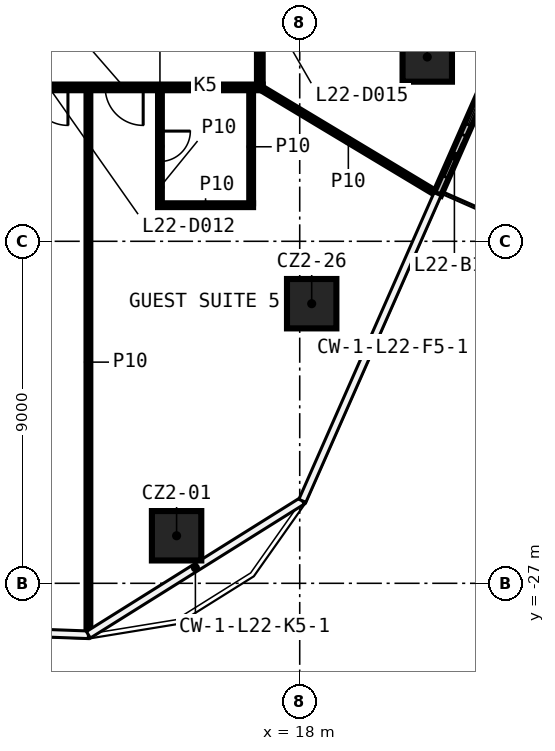
"""IFC4 building model, lengths in metres.
Left out: names, types, materials, properties, quantities, classifications, styles, units other than length and angle.
Written with IfcOpenShell. Run it as: python <this file> out.ifc"""

import sys

from ifc_helpers import new_model, si_unit, direction, frame, frame_2d, origin, origin_2d, place, context, subcontext, project, spatial, rectangle, extrude, element, fill, save


model = new_model("IFC4")
c1 = context("Model", 3, precision=1e-05, world=origin(), true_north=direction((0.0, 1.0)))
c2 = subcontext(c1, "Body", "Model", "MODEL_VIEW")
j1 = project(units=[si_unit("LENGTHUNIT", "METRE"), si_unit("PLANEANGLEUNIT", "RADIAN")], contexts=[c1])
p1 = place(None, origin())
s1 = spatial("IfcSite", under=j1, at=p1, CompositionType="ELEMENT")
p2 = place(p1, origin())
s2 = spatial("IfcBuilding", under=s1, at=p2, CompositionType="ELEMENT")
p3 = place(p2, frame((0.0, 0.0, 106.3)))
s3 = spatial("IfcBuildingStorey", under=s2, at=p3, CompositionType="ELEMENT", Elevation=106.3)
for number, where, z_axis, x_axis in (
    (1, (14.76, -25.749, 0.0), (0.0, 0.0, 1.0), (1.0, 0.0, 0.0)),
    (2, (21.356, -13.15, 0.0), (0.0, 0.0, 1.0), (1.0, 0.0, 0.0)),
    (3, (18.315, -19.642, 0.0), (0.0, 0.0, 1.0), (1.0, 0.0, 0.0)),
):
    element("IfcColumn", number, at=place(p3, frame(where, z_axis=z_axis, x_axis=x_axis)), inside=s3, PredefinedType="COLUMN", context=c2, shape_type="SweptSolid", body=[
        extrude(rectangle(XDim=1.3, YDim=1.3, at=origin_2d()), origin(), (0.0, 0.0, 1.0), 3.3),
    ])
p4 = place(p3, frame((14.272, -17.05, 0.0), z_axis=(0.0, 0.0, 1.0), x_axis=(1.0, 0.0, 0.0)))
e4 = element("IfcWall", 4, at=p4, inside=s3, PredefinedType="PARTITIONING", context=c2, shape_type="SweptSolid", body=[
    extrude(rectangle(XDim=2.5, YDim=0.1, at=frame_2d((1.25, 0.0))), origin(), (0.0, 0.0, 1.0), 3.3),
])
p5 = place(p3, frame((17.025, -13.95, 0.0), z_axis=(0.0, 0.0, 1.0), x_axis=(-1.0, 0.0, 0.0)))
e5 = element("IfcWall", 5, at=p5, inside=s3, PredefinedType="PARTITIONING", context=c2, shape_type="SweptSolid", body=[
    extrude(rectangle(XDim=34.05, YDim=0.15, at=frame_2d((17.025, 0.0))), origin(), (0.0, 0.0, 1.0), 3.3),
])
p6 = place(p5, frame((31.974, 0.0, 0.0)))
e6 = element("IfcOpeningElement", 6, at=p6, cuts=e5, PredefinedType="OPENING", context=c2, shape_type="SweptSolid", body=[
    extrude(rectangle(XDim=0.9, YDim=2.1, at=frame_2d((0.45, 1.05))), frame((0.0, 0.085, 0.0), z_axis=(0.0, -1.0, 0.0), x_axis=(1.0, 0.0, 0.0)), (0.0, 0.0, 1.0), 0.17),
])
p7 = place(p5, frame((27.543, 0.0, 0.0)))
e7 = element("IfcOpeningElement", 7, at=p7, cuts=e5, PredefinedType="OPENING", context=c2, shape_type="SweptSolid", body=[
    extrude(rectangle(XDim=1.0, YDim=2.1, at=frame_2d((0.5, 1.05))), frame((0.0, 0.085, 0.0), z_axis=(0.0, -1.0, 0.0), x_axis=(1.0, 0.0, 0.0)), (0.0, 0.0, 1.0), 0.17),
])
p8 = place(p5, frame((16.333, 0.0, 0.0)))
e8 = element("IfcOpeningElement", 8, at=p8, cuts=e5, PredefinedType="OPENING", context=c2, shape_type="SweptSolid", body=[
    extrude(rectangle(XDim=1.0, YDim=2.1, at=frame_2d((0.5, 1.05))), frame((0.0, 0.085, 0.0), z_axis=(0.0, -1.0, 0.0), x_axis=(1.0, 0.0, 0.0)), (0.0, 0.0, 1.0), 0.17),
])
p9 = place(p5, frame((12.006, 0.0, 0.0)))
e9 = element("IfcOpeningElement", 9, at=p9, cuts=e5, PredefinedType="OPENING", context=c2, shape_type="SweptSolid", body=[
    extrude(rectangle(XDim=1.0, YDim=2.1, at=frame_2d((0.5, 1.05))), frame((0.0, 0.085, 0.0), z_axis=(0.0, -1.0, 0.0), x_axis=(1.0, 0.0, 0.0)), (0.0, 0.0, 1.0), 0.17),
])
p10 = place(p5, frame((5.124, 0.0, 0.0)))
e10 = element("IfcOpeningElement", 10, at=p10, cuts=e5, PredefinedType="OPENING", context=c2, shape_type="SweptSolid", body=[
    extrude(rectangle(XDim=1.0, YDim=2.1, at=frame_2d((0.5, 1.05))), frame((0.0, 0.085, 0.0), z_axis=(0.0, -1.0, 0.0), x_axis=(1.0, 0.0, 0.0)), (0.0, 0.0, 1.0), 0.17),
])
p11 = place(p5, frame((3.144, 0.0, 0.0)))
e11 = element("IfcOpeningElement", 11, at=p11, cuts=e5, PredefinedType="OPENING", context=c2, shape_type="SweptSolid", body=[
    extrude(rectangle(XDim=1.0, YDim=2.1, at=frame_2d((0.5, 1.05))), frame((0.0, 0.085, 0.0), z_axis=(0.0, -1.0, 0.0), x_axis=(1.0, 0.0, 0.0)), (0.0, 0.0, 1.0), 0.17),
])
p12 = place(p3, frame((16.95, 13.875, 0.0), z_axis=(0.0, 0.0, 1.0), x_axis=(0.0, -1.0, 0.0)))
e12 = element("IfcWall", 12, at=p12, inside=s3, PredefinedType="PARTITIONING", context=c2, shape_type="SweptSolid", body=[
    extrude(rectangle(XDim=27.75, YDim=0.15, at=frame_2d((13.875, 0.0))), origin(), (0.0, 0.0, 1.0), 3.3),
])
p13 = place(p12, frame((24.917, 0.0, 0.0)))
e13 = element("IfcOpeningElement", 13, at=p13, cuts=e12, PredefinedType="OPENING", context=c2, shape_type="SweptSolid", body=[
    extrude(rectangle(XDim=0.9, YDim=2.1, at=frame_2d((0.45, 1.05))), frame((0.0, 0.085, 0.0), z_axis=(0.0, -1.0, 0.0), x_axis=(1.0, 0.0, 0.0)), (0.0, 0.0, 1.0), 0.17),
])
p14 = place(p12, frame((20.086, 0.0, 0.0)))
e14 = element("IfcOpeningElement", 14, at=p14, cuts=e12, PredefinedType="OPENING", context=c2, shape_type="SweptSolid", body=[
    extrude(rectangle(XDim=0.9, YDim=2.1, at=frame_2d((0.45, 1.05))), frame((0.0, 0.085, 0.0), z_axis=(0.0, -1.0, 0.0), x_axis=(1.0, 0.0, 0.0)), (0.0, 0.0, 1.0), 0.17),
])
p15 = place(p12, frame((16.047, 0.0, 0.0)))
e15 = element("IfcOpeningElement", 15, at=p15, cuts=e12, PredefinedType="OPENING", context=c2, shape_type="SweptSolid", body=[
    extrude(rectangle(XDim=0.9, YDim=2.1, at=frame_2d((0.45, 1.05))), frame((0.0, 0.085, 0.0), z_axis=(0.0, -1.0, 0.0), x_axis=(1.0, 0.0, 0.0)), (0.0, 0.0, 1.0), 0.17),
])
p16 = place(p12, frame((11.091, 0.0, 0.0)))
e16 = element("IfcOpeningElement", 16, at=p16, cuts=e12, PredefinedType="OPENING", context=c2, shape_type="SweptSolid", body=[
    extrude(rectangle(XDim=0.9, YDim=2.1, at=frame_2d((0.45, 1.05))), frame((0.0, 0.085, 0.0), z_axis=(0.0, -1.0, 0.0), x_axis=(1.0, 0.0, 0.0)), (0.0, 0.0, 1.0), 0.17),
])
p17 = place(p12, frame((7.093, 0.0, 0.0)))
e17 = element("IfcOpeningElement", 17, at=p17, cuts=e12, PredefinedType="OPENING", context=c2, shape_type="SweptSolid", body=[
    extrude(rectangle(XDim=0.9, YDim=2.1, at=frame_2d((0.45, 1.05))), frame((0.0, 0.085, 0.0), z_axis=(0.0, -1.0, 0.0), x_axis=(1.0, 0.0, 0.0)), (0.0, 0.0, 1.0), 0.17),
])
p18 = place(p12, frame((2.057, 0.0, 0.0)))
e18 = element("IfcOpeningElement", 18, at=p18, cuts=e12, PredefinedType="OPENING", context=c2, shape_type="SweptSolid", body=[
    extrude(rectangle(XDim=0.9, YDim=2.1, at=frame_2d((0.45, 1.05))), frame((0.0, 0.085, 0.0), z_axis=(0.0, -1.0, 0.0), x_axis=(1.0, 0.0, 0.0)), (0.0, 0.0, 1.0), 0.17),
])
p19 = place(p3, frame((16.722, -17.0, 0.0), z_axis=(0.0, 0.0, 1.0), x_axis=(0.0, 1.0, 0.0)))
e19 = element("IfcWall", 19, at=p19, inside=s3, PredefinedType="PARTITIONING", context=c2, shape_type="SweptSolid", body=[
    extrude(rectangle(XDim=2.975, YDim=0.1, at=frame_2d((1.488, 0.0))), origin(), (0.0, 0.0, 1.0), 3.3),
])
p20 = place(p3, frame((14.322, -14.025, 0.0), z_axis=(0.0, 0.0, 1.0), x_axis=(0.0, -1.0, 0.0)))
e20 = element("IfcWall", 20, at=p20, inside=s3, PredefinedType="PARTITIONING", context=c2, shape_type="SweptSolid", body=[
    extrude(rectangle(XDim=3.025, YDim=0.1, at=frame_2d((1.513, 0.0))), origin(), (0.0, 0.0, 1.0), 3.3),
])
p21 = place(p20, frame((1.075, 0.0, 0.0)))
e21 = element("IfcOpeningElement", 21, at=p21, cuts=e20, PredefinedType="OPENING", context=c2, shape_type="SweptSolid", body=[
    extrude(rectangle(XDim=0.8, YDim=2.1, at=frame_2d((0.4, 1.05))), frame((0.0, 0.06, 0.0), z_axis=(0.0, -1.0, 0.0), x_axis=(1.0, 0.0, 0.0)), (0.0, 0.0, 1.0), 0.12),
])
p22 = place(p3, frame((12.44, -28.334, 0.0), z_axis=(0.0, 0.0, 1.0), x_axis=(0.0, 1.0, 0.0)))
e22 = element("IfcWall", 22, at=p22, inside=s3, PredefinedType="PARTITIONING", context=c2, shape_type="SweptSolid", body=[
    extrude(rectangle(XDim=14.31, YDim=0.1, at=frame_2d((7.155, 0.0))), origin(), (0.0, 0.0, 1.0), 3.3),
])
p23 = place(p3, frame((16.95, -13.95, 0.0), z_axis=(0.0, 0.0, 1.0), x_axis=(0.857183640751, -0.515010879525, 0.0)))
e23 = element("IfcWall", 23, at=p23, inside=s3, PredefinedType="PARTITIONING", context=c2, shape_type="SweptSolid", body=[
    extrude(rectangle(XDim=5.436, YDim=0.1, at=frame_2d((2.718, 0.0))), origin(), (0.0, 0.0, 1.0), 3.3),
])
p24 = place(p3, frame((21.626, -16.76, 0.0), z_axis=(0.0, 0.0, 1.0), x_axis=(0.403293642116, 0.915070619258, 0.0)))
e24 = element("IfcWall", 24, at=p24, inside=s3, PredefinedType="SOLIDWALL", context=c2, shape_type="SweptSolid", body=[
    extrude(rectangle(XDim=17.657, YDim=0.2, at=frame_2d((8.829, 0.0))), origin(), (0.0, 0.0, 1.0), 3.3),
])
p25 = place(p24, frame((2.0, 0.0, 0.6)))
e25 = element("IfcOpeningElement", 25, at=p25, cuts=e24, PredefinedType="OPENING", context=c2, shape_type="SweptSolid", body=[
    extrude(rectangle(XDim=1.6, YDim=2.4, at=frame_2d((0.8, 1.2))), frame((0.0, 0.11, 0.0), z_axis=(0.0, -1.0, 0.0), x_axis=(1.0, 0.0, 0.0)), (0.0, 0.0, 1.0), 0.22),
])
p26 = place(p24, frame((0.5, 0.0, 0.0)))
e26 = element("IfcOpeningElement", 26, at=p26, cuts=e24, PredefinedType="OPENING", context=c2, shape_type="SweptSolid", body=[
    extrude(rectangle(XDim=1.2, YDim=2.4, at=frame_2d((0.6, 1.2))), frame((0.0, 0.11, 0.0), z_axis=(0.0, -1.0, 0.0), x_axis=(1.0, 0.0, 0.0)), (0.0, 0.0, 1.0), 0.22),
])
p27 = place(p24, frame((6.414, 0.0, 0.6)))
e27 = element("IfcOpeningElement", 27, at=p27, cuts=e24, PredefinedType="OPENING", context=c2, shape_type="SweptSolid", body=[
    extrude(rectangle(XDim=1.6, YDim=2.4, at=frame_2d((0.8, 1.2))), frame((0.0, 0.11, 0.0), z_axis=(0.0, -1.0, 0.0), x_axis=(1.0, 0.0, 0.0)), (0.0, 0.0, 1.0), 0.22),
])
p28 = place(p24, frame((4.914, 0.0, 0.0)))
e28 = element("IfcOpeningElement", 28, at=p28, cuts=e24, PredefinedType="OPENING", context=c2, shape_type="SweptSolid", body=[
    extrude(rectangle(XDim=1.2, YDim=2.4, at=frame_2d((0.6, 1.2))), frame((0.0, 0.11, 0.0), z_axis=(0.0, -1.0, 0.0), x_axis=(1.0, 0.0, 0.0)), (0.0, 0.0, 1.0), 0.22),
])
p29 = place(p24, frame((9.329, 0.0, 0.6)))
e29 = element("IfcOpeningElement", 29, at=p29, cuts=e24, PredefinedType="OPENING", context=c2, shape_type="SweptSolid", body=[
    extrude(rectangle(XDim=1.6, YDim=2.4, at=frame_2d((0.8, 1.2))), frame((0.0, 0.11, 0.0), z_axis=(0.0, -1.0, 0.0), x_axis=(1.0, 0.0, 0.0)), (0.0, 0.0, 1.0), 0.22),
])
p30 = place(p24, frame((11.329, 0.0, 0.0)))
e30 = element("IfcOpeningElement", 30, at=p30, cuts=e24, PredefinedType="OPENING", context=c2, shape_type="SweptSolid", body=[
    extrude(rectangle(XDim=1.2, YDim=2.4, at=frame_2d((0.6, 1.2))), frame((0.0, 0.11, 0.0), z_axis=(0.0, -1.0, 0.0), x_axis=(1.0, 0.0, 0.0)), (0.0, 0.0, 1.0), 0.22),
])
p31 = place(p24, frame((15.243, 0.0, 0.6)))
e31 = element("IfcOpeningElement", 31, at=p31, cuts=e24, PredefinedType="OPENING", context=c2, shape_type="SweptSolid", body=[
    extrude(rectangle(XDim=1.6, YDim=2.4, at=frame_2d((0.8, 1.2))), frame((0.0, 0.11, 0.0), z_axis=(0.0, -1.0, 0.0), x_axis=(1.0, 0.0, 0.0)), (0.0, 0.0, 1.0), 0.22),
])
p32 = place(p24, frame((13.743, 0.0, 0.0)))
e32 = element("IfcOpeningElement", 32, at=p32, cuts=e24, PredefinedType="OPENING", context=c2, shape_type="SweptSolid", body=[
    extrude(rectangle(XDim=1.2, YDim=2.4, at=frame_2d((0.6, 1.2))), frame((0.0, 0.11, 0.0), z_axis=(0.0, -1.0, 0.0), x_axis=(1.0, 0.0, 0.0)), (0.0, 0.0, 1.0), 0.22),
])
p33 = place(p10, origin())
e33 = element("IfcDoor", 33, at=p33, inside=s3, OperationType="SINGLE_SWING_RIGHT", PredefinedType="DOOR", context=c2, shape_type="SweptSolid", body=[
    extrude(rectangle(XDim=1.0, YDim=2.1, at=frame_2d((0.5, 1.05))), frame((0.0, 0.025, 0.0), z_axis=(0.0, -1.0, 0.0), x_axis=(1.0, 0.0, 0.0)), (0.0, 0.0, 1.0), 0.05),
])
fill(e10, e33)
p34 = place(p21, origin())
e34 = element("IfcDoor", 34, at=p34, inside=s3, OperationType="SINGLE_SWING_RIGHT", PredefinedType="DOOR", context=c2, shape_type="SweptSolid", body=[
    extrude(rectangle(XDim=0.8, YDim=2.1, at=frame_2d((0.4, 1.05))), frame((0.0, 0.025, 0.0), z_axis=(0.0, -1.0, 0.0), x_axis=(1.0, 0.0, 0.0)), (0.0, 0.0, 1.0), 0.05),
])
fill(e21, e34)
p35 = place(p11, origin())
e35 = element("IfcDoor", 35, at=p35, inside=s3, OperationType="SINGLE_SWING_LEFT", PredefinedType="DOOR", context=c2, shape_type="SweptSolid", body=[
    extrude(rectangle(XDim=1.0, YDim=2.1, at=frame_2d((0.5, 1.05))), frame((0.0, 0.025, 0.0), z_axis=(0.0, -1.0, 0.0), x_axis=(1.0, 0.0, 0.0)), (0.0, 0.0, 1.0), 0.05),
])
fill(e11, e35)
p36 = place(p25, origin())
e36 = element("IfcWindow", 36, at=p36, inside=s3, PartitioningType="SINGLE_PANEL", PredefinedType="WINDOW", context=c2, shape_type="SweptSolid", body=[
    extrude(rectangle(XDim=1.6, YDim=2.4, at=frame_2d((0.8, 1.2))), frame((0.0, 0.03, 0.0), z_axis=(0.0, -1.0, 0.0), x_axis=(1.0, 0.0, 0.0)), (0.0, 0.0, 1.0), 0.06),
])
fill(e25, e36)
p37 = place(p26, origin())
e37 = element("IfcDoor", 37, at=p37, inside=s3, OperationType="SLIDING_TO_LEFT", PredefinedType="DOOR", context=c2, shape_type="SweptSolid", body=[
    extrude(rectangle(XDim=1.2, YDim=2.4, at=frame_2d((0.6, 1.2))), frame((0.0, 0.025, 0.0), z_axis=(0.0, -1.0, 0.0), x_axis=(1.0, 0.0, 0.0)), (0.0, 0.0, 1.0), 0.05),
])
fill(e26, e37)
save(model, sys.argv[1])
